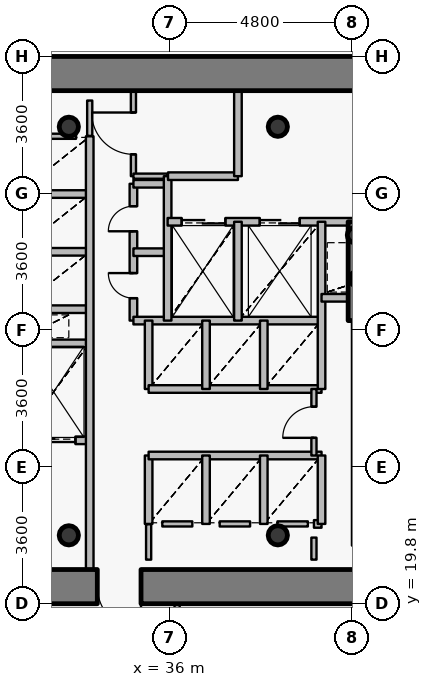
"""IFC4 building model, lengths in metres.
Left out: names, types, materials, properties, quantities, classifications, styles, units other than length and angle.
Written with IfcOpenShell. Run it as: python <this file> out.ifc"""

import sys

from ifc_helpers import new_model, si_unit, direction, frame, frame_2d, origin, origin_2d, place, context, subcontext, project, spatial, rectangle, hollow_circle, extrude, source, transform, mapped, element, fill, save


model = new_model("IFC4")
c1 = context("Model", 3, precision=1e-05, world=origin(), true_north=direction((0.0, 1.0)))
c2 = subcontext(c1, "Body", "Model", "MODEL_VIEW")
j1 = project(units=[si_unit("LENGTHUNIT", "METRE"), si_unit("PLANEANGLEUNIT", "RADIAN")], contexts=[c1])
p1 = place(None, origin())
s1 = spatial("IfcSite", under=j1, at=p1, CompositionType="ELEMENT")
p2 = place(p1, origin())
s2 = spatial("IfcBuilding", under=s1, at=p2, CompositionType="ELEMENT")
p3 = place(p2, frame((0.0, 0.0, 22.8)))
s3 = spatial("IfcBuildingStorey", under=s2, at=p3, CompositionType="ELEMENT", Elevation=22.8)
for number, where, z_axis, x_axis in (
    (1, (33.35, 21.6, 0.0), (0.0, 0.0, 1.0), (1.0, 0.0, 0.0)),
    (2, (38.85, 21.6, 0.0), (0.0, 0.0, 1.0), (1.0, 0.0, 0.0)),
    (3, (38.85, 32.35, 0.0), (0.0, 0.0, 1.0), (1.0, 0.0, 0.0)),
    (4, (33.35, 32.35, 0.0), (0.0, 0.0, 1.0), (1.0, 0.0, 0.0)),
):
    element("IfcColumn", number, at=place(p3, frame(where, z_axis=z_axis, x_axis=x_axis)), inside=s3, PredefinedType="COLUMN", context=c2, shape_type="SweptSolid", body=[
        extrude(hollow_circle(Radius=0.254, WallThickness=0.02, at=origin_2d()), origin(), (0.0, 0.0, 1.0), 4.2),
    ])
for number, where, z_axis, x_axis in (
    (5, (40.95, 28.35, 0.0), (0.0, 0.0, 1.0), (1.0, 0.0, 0.0)),
    (6, (40.88, 29.5, 0.0), (0.0, 0.0, 1.0), (1.0, 0.0, 0.0)),
):
    element("IfcColumn", number, at=place(p3, frame(where, z_axis=z_axis, x_axis=x_axis)), inside=s3, PredefinedType="COLUMN", context=c2, shape_type="SweptSolid", body=[
        extrude(hollow_circle(Radius=0.203, WallThickness=0.016, at=origin_2d()), origin(), (0.0, 0.0, 1.0), 4.2),
    ])
p4 = place(p3, frame((26.75, 33.75, 0.0), z_axis=(0.0, 0.0, 1.0), x_axis=(1.0, 0.0, 0.0)))
e7 = element("IfcWall", 7, at=p4, inside=s3, PredefinedType="SHEAR", context=c2, shape_type="SweptSolid", body=[
    extrude(rectangle(XDim=18.5, YDim=0.9, at=frame_2d((9.25, 0.0))), origin(), (0.0, 0.0, 1.0), 3.35),
])
p5 = place(p3, frame((45.25, 20.25, 0.0), z_axis=(0.0, 0.0, 1.0), x_axis=(-1.0, 0.0, 0.0)))
e8 = element("IfcWall", 8, at=p5, inside=s3, PredefinedType="SHEAR", context=c2, shape_type="SweptSolid", body=[
    extrude(rectangle(XDim=18.5, YDim=0.9, at=frame_2d((9.25, 0.0))), origin(), (0.0, 0.0, 1.0), 3.35),
])
p6 = place(p5, frame((10.0, 0.0, 0.0)))
e9 = element("IfcOpeningElement", 9, at=p6, cuts=e8, PredefinedType="OPENING", context=c2, shape_type="SweptSolid", body=[
    extrude(rectangle(XDim=1.15, YDim=2.15, at=origin_2d()), frame((0.575, 0.46, 1.075), z_axis=(0.0, -1.0, 0.0), x_axis=(1.0, 0.0, 0.0)), (0.0, 0.0, 1.0), 0.92),
])
p7 = place(p3, frame((40.9, 27.25, 0.0), z_axis=(0.0, 0.0, 1.0), x_axis=(0.0, 1.0, 0.0)))
e10 = element("IfcWall", 10, at=p7, inside=s3, PredefinedType="SHEAR", context=c2, shape_type="SweptSolid", body=[
    extrude(rectangle(XDim=2.6, YDim=0.4, at=frame_2d((1.3, 0.0))), origin(), (0.0, 0.0, 1.0), 3.5),
])
p8 = place(p3, frame((32.0, 24.1, 0.0), z_axis=(0.0, 0.0, 1.0), x_axis=(1.0, 0.0, 0.0)))
e11 = element("IfcWall", 11, at=p8, inside=s3, PredefinedType="PARTITIONING", context=c2, shape_type="SweptSolid", body=[
    extrude(rectangle(XDim=1.9, YDim=0.2, at=frame_2d((0.95, 0.0))), origin(), (0.0, 0.0, 1.0), 3.485),
])
p9 = place(p8, frame((0.375, 0.0, 0.0)))
e12 = element("IfcOpeningElement", 12, at=p9, cuts=e11, PredefinedType="OPENING", context=c2, shape_type="SweptSolid", body=[
    extrude(rectangle(XDim=1.15, YDim=2.15, at=origin_2d()), frame((0.575, 0.11, 1.075), z_axis=(0.0, -1.0, 0.0), x_axis=(1.0, 0.0, 0.0)), (0.0, 0.0, 1.0), 0.22),
])
for number, where, z_axis, x_axis in (
    (13, (32.0, 26.65, 0.0), (0.0, 0.0, 1.0), (1.0, 0.0, 0.0)),
    (14, (32.0, 27.55, 0.0), (0.0, 0.0, 1.0), (1.0, 0.0, 0.0)),
    (15, (32.0, 29.06, 0.0), (0.0, 0.0, 1.0), (1.0, 0.0, 0.0)),
    (16, (32.0, 30.58, 0.0), (0.0, 0.0, 1.0), (1.0, 0.0, 0.0)),
):
    element("IfcWall", number, at=place(p3, frame(where, z_axis=z_axis, x_axis=x_axis)), inside=s3, PredefinedType="PARTITIONING", context=c2, shape_type="SweptSolid", body=[
        extrude(rectangle(XDim=1.9, YDim=0.2, at=frame_2d((0.95, 0.0))), origin(), (0.0, 0.0, 1.0), 3.485),
    ])
p10 = place(p3, frame((33.9, 20.7, 0.0), z_axis=(0.0, 0.0, 1.0), x_axis=(0.0, 1.0, 0.0)))
e17 = element("IfcWall", 17, at=p10, inside=s3, PredefinedType="PARTITIONING", context=c2, shape_type="SweptSolid", body=[
    extrude(rectangle(XDim=11.4, YDim=0.2, at=frame_2d((5.7, 0.0))), origin(), (0.0, 0.0, 1.0), 3.485),
])
p11 = place(p3, frame((35.05, 27.25, 0.0), z_axis=(0.0, 0.0, 1.0), x_axis=(0.0, 1.0, 0.0)))
e18 = element("IfcWall", 18, at=p11, inside=s3, PredefinedType="PARTITIONING", context=c2, shape_type="SweptSolid", body=[
    extrude(rectangle(XDim=3.6, YDim=0.2, at=frame_2d((1.8, 0.0))), origin(), (0.0, 0.0, 1.0), 3.9),
])
p12 = place(p11, frame((0.59, 0.0, 0.0)))
e19 = element("IfcOpeningElement", 19, at=p12, cuts=e18, PredefinedType="OPENING", context=c2, shape_type="SweptSolid", body=[
    extrude(rectangle(XDim=0.66, YDim=2.05, at=origin_2d()), frame((0.33, 0.11, 1.025), z_axis=(0.0, -1.0, 0.0), x_axis=(1.0, 0.0, 0.0)), (0.0, 0.0, 1.0), 0.22),
])
p13 = place(p11, frame((2.35, 0.0, 0.0)))
e20 = element("IfcOpeningElement", 20, at=p13, cuts=e18, PredefinedType="OPENING", context=c2, shape_type="SweptSolid", body=[
    extrude(rectangle(XDim=0.66, YDim=2.05, at=origin_2d()), frame((0.33, 0.11, 1.025), z_axis=(0.0, -1.0, 0.0), x_axis=(1.0, 0.0, 0.0)), (0.0, 0.0, 1.0), 0.22),
])
p14 = place(p3, frame((35.05, 27.25, 0.0), z_axis=(0.0, 0.0, 1.0), x_axis=(1.0, 0.0, 0.0)))
e21 = element("IfcWall", 21, at=p14, inside=s3, PredefinedType="PARTITIONING", context=c2, shape_type="SweptSolid", body=[
    extrude(rectangle(XDim=4.95, YDim=0.2, at=frame_2d((2.475, 0.0))), origin(), (0.0, 0.0, 1.0), 3.485),
])
for number, where, z_axis, x_axis in (
    (22, (35.05, 29.05, 0.0), (0.0, 0.0, 1.0), (1.0, 0.0, 0.0)),
    (23, (35.05, 30.85, 0.0), (0.0, 0.0, 1.0), (1.0, 0.0, 0.0)),
):
    element("IfcWall", number, at=place(p3, frame(where, z_axis=z_axis, x_axis=x_axis)), inside=s3, PredefinedType="PARTITIONING", context=c2, shape_type="SweptSolid", body=[
        extrude(rectangle(XDim=0.9, YDim=0.2, at=frame_2d((0.45, 0.0))), origin(), (0.0, 0.0, 1.0), 3.9),
    ])
p15 = place(p3, frame((35.05, 31.05, 0.0), z_axis=(0.0, 0.0, 1.0), x_axis=(0.0, 1.0, 0.0)))
e24 = element("IfcWall", 24, at=p15, inside=s3, PredefinedType="PARTITIONING", context=c2, shape_type="SweptSolid", body=[
    extrude(rectangle(XDim=2.25, YDim=0.135, at=frame_2d((1.125, 0.0))), origin(), (0.0, 0.0, 1.0), 3.485),
])
p16 = place(p15, frame((0.575, 0.0, 0.0)))
e25 = element("IfcOpeningElement", 25, at=p16, cuts=e24, PredefinedType="OPENING", context=c2, shape_type="SweptSolid", body=[
    extrude(rectangle(XDim=1.1, YDim=2.15, at=origin_2d()), frame((0.55, 0.078, 1.075), z_axis=(0.0, -1.0, 0.0), x_axis=(1.0, 0.0, 0.0)), (0.0, 0.0, 1.0), 0.155),
])
p17 = place(p3, frame((35.05, 31.05, 0.0), z_axis=(0.0, 0.0, 1.0), x_axis=(1.0, 0.0, 0.0)))
e26 = element("IfcWall", 26, at=p17, inside=s3, PredefinedType="PARTITIONING", context=c2, shape_type="SweptSolid", body=[
    extrude(rectangle(XDim=0.9, YDim=0.135, at=frame_2d((0.45, 0.0))), origin(), (0.0, 0.0, 1.0), 3.9),
])
p18 = place(p3, frame((35.45, 21.9, 0.0), z_axis=(0.0, 0.0, 1.0), x_axis=(0.0, 1.0, 0.0)))
e27 = element("IfcWall", 27, at=p18, inside=s3, PredefinedType="PARTITIONING", context=c2, shape_type="SweptSolid", body=[
    extrude(rectangle(XDim=1.8, YDim=0.2, at=frame_2d((0.9, 0.0))), origin(), (0.0, 0.0, 1.0), 3.9),
])
p19 = place(p3, frame((35.45, 23.7, 0.0), z_axis=(0.0, 0.0, 1.0), x_axis=(1.0, 0.0, 0.0)))
e28 = element("IfcWall", 28, at=p19, inside=s3, PredefinedType="PARTITIONING", context=c2, shape_type="SweptSolid", body=[
    extrude(rectangle(XDim=4.55, YDim=0.2, at=frame_2d((2.275, 0.0))), origin(), (0.0, 0.0, 1.0), 3.485),
])
p20 = place(p3, frame((35.45, 25.45, 0.0), z_axis=(0.0, 0.0, 1.0), x_axis=(0.0, 1.0, 0.0)))
e29 = element("IfcWall", 29, at=p20, inside=s3, PredefinedType="PARTITIONING", context=c2, shape_type="SweptSolid", body=[
    extrude(rectangle(XDim=1.8, YDim=0.2, at=frame_2d((0.9, 0.0))), origin(), (0.0, 0.0, 1.0), 3.9),
])
p21 = place(p3, frame((35.45, 25.45, 0.0), z_axis=(0.0, 0.0, 1.0), x_axis=(1.0, 0.0, 0.0)))
e30 = element("IfcWall", 30, at=p21, inside=s3, PredefinedType="PARTITIONING", context=c2, shape_type="SweptSolid", body=[
    extrude(rectangle(XDim=4.55, YDim=0.2, at=frame_2d((2.275, 0.0))), origin(), (0.0, 0.0, 1.0), 3.485),
])
p22 = place(p3, frame((35.95, 27.25, 0.0), z_axis=(0.0, 0.0, 1.0), x_axis=(0.0, 1.0, 0.0)))
e31 = element("IfcWall", 31, at=p22, inside=s3, PredefinedType="PARTITIONING", context=c2, shape_type="SweptSolid", body=[
    extrude(rectangle(XDim=3.8, YDim=0.2, at=frame_2d((1.9, 0.0))), origin(), (0.0, 0.0, 1.0), 3.9),
])
p23 = place(p3, frame((35.95, 29.85, 0.0), z_axis=(0.0, 0.0, 1.0), x_axis=(1.0, 0.0, 0.0)))
e32 = element("IfcWall", 32, at=p23, inside=s3, PredefinedType="PARTITIONING", context=c2, shape_type="SweptSolid", body=[
    extrude(rectangle(XDim=8.49, YDim=0.2, at=frame_2d((4.245, 0.0))), origin(), (0.0, 0.0, 1.0), 3.485),
])
p24 = place(p23, frame((6.1, 0.0, 0.0)))
e33 = element("IfcOpeningElement", 33, at=p24, cuts=e32, PredefinedType="OPENING", context=c2, shape_type="SweptSolid", body=[
    extrude(rectangle(XDim=1.2, YDim=2.15, at=origin_2d()), frame((0.6, 0.11, 1.075), z_axis=(0.0, -1.0, 0.0), x_axis=(1.0, 0.0, 0.0)), (0.0, 0.0, 1.0), 0.22),
])
p25 = place(p23, frame((0.37, 0.0, 0.0)))
e34 = element("IfcOpeningElement", 34, at=p25, cuts=e32, PredefinedType="OPENING", context=c2, shape_type="SweptSolid", body=[
    extrude(rectangle(XDim=1.15, YDim=2.15, at=origin_2d()), frame((0.575, 0.11, 1.075), z_axis=(0.0, -1.0, 0.0), x_axis=(1.0, 0.0, 0.0)), (0.0, 0.0, 1.0), 0.22),
])
p26 = place(p23, frame((2.425, 0.0, 0.0)))
e35 = element("IfcOpeningElement", 35, at=p26, cuts=e32, PredefinedType="OPENING", context=c2, shape_type="SweptSolid", body=[
    extrude(rectangle(XDim=1.05, YDim=2.15, at=origin_2d()), frame((0.525, 0.11, 1.075), z_axis=(0.0, -1.0, 0.0), x_axis=(1.0, 0.0, 0.0)), (0.0, 0.0, 1.0), 0.22),
])
p27 = place(p3, frame((35.96, 31.05, 0.0), z_axis=(0.0, 0.0, 1.0), x_axis=(1.0, 0.0, 0.0)))
e36 = element("IfcWall", 36, at=p27, inside=s3, PredefinedType="PARTITIONING", context=c2, shape_type="SweptSolid", body=[
    extrude(rectangle(XDim=1.84, YDim=0.2, at=frame_2d((0.92, 0.0))), origin(), (0.0, 0.0, 1.0), 3.9),
])
p28 = place(p3, frame((36.2, 17.9, 0.0), z_axis=(0.0, 0.0, 1.0), x_axis=(0.0, 1.0, 0.0)))
e37 = element("IfcWall", 37, at=p28, inside=s3, PredefinedType="PARTITIONING", context=c2, shape_type="SweptSolid", body=[
    extrude(rectangle(XDim=1.9, YDim=0.135, at=frame_2d((0.95, 0.0))), origin(), (0.0, 0.0, 1.0), 2.685),
])
p29 = place(p28, frame((0.425, 0.0, 0.0)))
e38 = element("IfcOpeningElement", 38, at=p29, cuts=e37, PredefinedType="OPENING", context=c2, shape_type="SweptSolid", body=[
    extrude(rectangle(XDim=1.05, YDim=2.15, at=origin_2d()), frame((0.525, 0.078, 1.075), z_axis=(0.0, -1.0, 0.0), x_axis=(1.0, 0.0, 0.0)), (0.0, 0.0, 1.0), 0.155),
])
for number, where, z_axis, x_axis in (
    (39, (36.96, 21.9, 0.0), (0.0, 0.0, 1.0), (0.0, 1.0, 0.0)),
    (40, (36.96, 25.45, 0.0), (0.0, 0.0, 1.0), (0.0, 1.0, 0.0)),
):
    element("IfcWall", number, at=place(p3, frame(where, z_axis=z_axis, x_axis=x_axis)), inside=s3, PredefinedType="PARTITIONING", context=c2, shape_type="SweptSolid", body=[
        extrude(rectangle(XDim=1.8, YDim=0.2, at=frame_2d((0.9, 0.0))), origin(), (0.0, 0.0, 1.0), 3.9),
    ])
p30 = place(p3, frame((37.8, 27.25, 0.0), z_axis=(0.0, 0.0, 1.0), x_axis=(0.0, 1.0, 0.0)))
e41 = element("IfcWall", 41, at=p30, inside=s3, PredefinedType="PARTITIONING", context=c2, shape_type="SweptSolid", body=[
    extrude(rectangle(XDim=2.6, YDim=0.2, at=frame_2d((1.3, 0.0))), origin(), (0.0, 0.0, 1.0), 3.9),
])
p31 = place(p3, frame((37.8, 31.05, 0.0), z_axis=(0.0, 0.0, 1.0), x_axis=(0.0, 1.0, 0.0)))
e42 = element("IfcWall", 42, at=p31, inside=s3, PredefinedType="PARTITIONING", context=c2, shape_type="SweptSolid", body=[
    extrude(rectangle(XDim=2.25, YDim=0.2, at=frame_2d((1.125, 0.0))), origin(), (0.0, 0.0, 1.0), 3.485),
])
for number, where, z_axis, x_axis in (
    (43, (38.48, 21.9, 0.0), (0.0, 0.0, 1.0), (0.0, 1.0, 0.0)),
    (44, (38.48, 25.45, 0.0), (0.0, 0.0, 1.0), (0.0, 1.0, 0.0)),
):
    element("IfcWall", number, at=place(p3, frame(where, z_axis=z_axis, x_axis=x_axis)), inside=s3, PredefinedType="PARTITIONING", context=c2, shape_type="SweptSolid", body=[
        extrude(rectangle(XDim=1.8, YDim=0.2, at=frame_2d((0.9, 0.0))), origin(), (0.0, 0.0, 1.0), 3.9),
    ])
p32 = place(p3, frame((39.8, 21.9, 0.0), z_axis=(0.0, 0.0, 1.0), x_axis=(1.0, 0.0, 0.0)))
e45 = element("IfcWall", 45, at=p32, inside=s3, PredefinedType="PARTITIONING", context=c2, shape_type="SweptSolid", body=[
    extrude(rectangle(XDim=0.2, YDim=0.2, at=frame_2d((0.1, 0.0))), origin(), (0.0, 0.0, 1.0), 3.9),
])
p33 = place(p3, frame((39.8, 23.7, 0.0), z_axis=(0.0, 0.0, 1.0), x_axis=(0.0, 1.0, 0.0)))
e46 = element("IfcWall", 46, at=p33, inside=s3, PredefinedType="PARTITIONING", context=c2, shape_type="SweptSolid", body=[
    extrude(rectangle(XDim=1.75, YDim=0.135, at=frame_2d((0.875, 0.0))), origin(), (0.0, 0.0, 1.0), 3.9),
])
p34 = place(p33, frame((0.465, 0.0, 0.0)))
e47 = element("IfcOpeningElement", 47, at=p34, cuts=e46, PredefinedType="OPENING", context=c2, shape_type="SweptSolid", body=[
    extrude(rectangle(XDim=0.82, YDim=2.1, at=origin_2d()), frame((0.41, 0.078, 1.05), z_axis=(0.0, -1.0, 0.0), x_axis=(1.0, 0.0, 0.0)), (0.0, 0.0, 1.0), 0.155),
])
p35 = place(p3, frame((40.0, 21.9, 0.0), z_axis=(0.0, 0.0, 1.0), x_axis=(0.0, 1.0, 0.0)))
e48 = element("IfcWall", 48, at=p35, inside=s3, PredefinedType="PARTITIONING", context=c2, shape_type="SweptSolid", body=[
    extrude(rectangle(XDim=1.8, YDim=0.2, at=frame_2d((0.9, 0.0))), origin(), (0.0, 0.0, 1.0), 3.9),
])
p36 = place(p3, frame((40.0, 25.45, 0.0), z_axis=(0.0, 0.0, 1.0), x_axis=(0.0, 1.0, 0.0)))
e49 = element("IfcWall", 49, at=p36, inside=s3, PredefinedType="PARTITIONING", context=c2, shape_type="SweptSolid", body=[
    extrude(rectangle(XDim=4.4, YDim=0.2, at=frame_2d((2.2, 0.0))), origin(), (0.0, 0.0, 1.0), 3.9),
])
p37 = place(p3, frame((40.0, 27.85, 0.0), z_axis=(0.0, 0.0, 1.0), x_axis=(1.0, 0.0, 0.0)))
e50 = element("IfcWall", 50, at=p37, inside=s3, PredefinedType="PARTITIONING", context=c2, shape_type="SweptSolid", body=[
    extrude(rectangle(XDim=0.9, YDim=0.2, at=frame_2d((0.45, 0.0))), origin(), (0.0, 0.0, 1.0), 3.9),
])
p38 = place(p3, frame((40.9, 21.33, 0.0), z_axis=(0.0, 0.0, 1.0), x_axis=(0.0, 1.0, 0.0)))
e51 = element("IfcWall", 51, at=p38, inside=s3, PredefinedType="PARTITIONING", context=c2, shape_type="SweptSolid", body=[
    extrude(rectangle(XDim=5.91, YDim=0.2, at=frame_2d((2.955, 0.0))), origin(), (0.0, 0.0, 1.0), 3.435),
])
p39 = place(p3, frame((36.6, 21.9, 0.0), z_axis=(0.0, 0.0, 1.0), x_axis=(-1.0, 0.0, 0.0)))
e52 = element("IfcWall", 52, at=p39, inside=s3, PredefinedType="PARTITIONING", context=c2, shape_type="SweptSolid", body=[
    extrude(rectangle(XDim=0.79, YDim=0.135, at=frame_2d((0.395, 0.0))), origin(), (0.0, 0.0, 1.0), 3.9),
])
p40 = place(p3, frame((38.12, 21.9, 0.0), z_axis=(0.0, 0.0, 1.0), x_axis=(-1.0, 0.0, 0.0)))
e53 = element("IfcWall", 53, at=p40, inside=s3, PredefinedType="PARTITIONING", context=c2, shape_type="SweptSolid", body=[
    extrude(rectangle(XDim=0.8, YDim=0.135, at=frame_2d((0.4, 0.0))), origin(), (0.0, 0.0, 1.0), 3.9),
])
p41 = place(p3, frame((39.64, 21.9, 0.0), z_axis=(0.0, 0.0, 1.0), x_axis=(-1.0, 0.0, 0.0)))
e54 = element("IfcWall", 54, at=p41, inside=s3, PredefinedType="PARTITIONING", context=c2, shape_type="SweptSolid", body=[
    extrude(rectangle(XDim=0.8, YDim=0.135, at=frame_2d((0.4, 0.0))), origin(), (0.0, 0.0, 1.0), 3.485),
])
p42 = place(p3, frame((32.36, 32.1, 0.0), z_axis=(0.0, 0.0, 1.0), x_axis=(1.0, 0.0, 0.0)))
e55 = element("IfcWall", 55, at=p42, inside=s3, PredefinedType="PARTITIONING", context=c2, shape_type="SweptSolid", body=[
    extrude(rectangle(XDim=1.18, YDim=0.135, at=frame_2d((0.59, 0.0))), origin(), (0.0, 0.0, 1.0), 3.485),
])
p43 = place(p3, frame((39.8, 20.96, 0.0), z_axis=(0.0, 0.0, 1.0), x_axis=(0.0, 1.0, 0.0)))
e56 = element("IfcWall", 56, at=p43, inside=s3, PredefinedType="PARTITIONING", context=c2, shape_type="SweptSolid", body=[
    extrude(rectangle(XDim=0.58, YDim=0.135, at=frame_2d((0.29, 0.0))), origin(), (0.0, 0.0, 1.0), 3.435),
])
for number, where, z_axis, x_axis in (
    (57, (35.45, 21.89, 0.0), (0.0, 0.0, 1.0), (0.0, -1.0, 0.0)),
    (58, (33.9, 32.11, 0.0), (0.0, 0.0, 1.0), (0.0, 1.0, 0.0)),
):
    element("IfcWall", number, at=place(p3, frame(where, z_axis=z_axis, x_axis=x_axis)), inside=s3, PredefinedType="PARTITIONING", context=c2, shape_type="SweptSolid", body=[
        extrude(rectangle(XDim=0.93, YDim=0.135, at=frame_2d((0.465, 0.0))), origin(), (0.0, 0.0, 1.0), 3.485),
    ])
m1 = source(origin(), c2, "Body", "SweptSolid", [
    extrude(rectangle(XDim=1.15, YDim=2.15, at=origin_2d()), frame((0.575, 0.025, 1.075), z_axis=(0.0, -1.0, 0.0), x_axis=(1.0, 0.0, 0.0)), (0.0, 0.0, 1.0), 0.05),
])
p44 = place(p6, origin())
e59 = element("IfcDoor", 59, at=p44, inside=s3, OperationType="SINGLE_SWING_LEFT", PredefinedType="DOOR", context=c2, shape_type="MappedRepresentation", body=[
    mapped(m1, transform((0.0, 0.0, 0.0), x_axis=(1.0, 0.0, 0.0), y_axis=(0.0, 1.0, 0.0), z_axis=(0.0, 0.0, 1.0), scale=1.0)),
])
fill(e9, e59)
m2 = source(origin(), c2, "Body", "SweptSolid", [
    extrude(rectangle(XDim=1.15, YDim=2.15, at=origin_2d()), frame((0.575, 0.025, 1.075), z_axis=(0.0, -1.0, 0.0), x_axis=(1.0, 0.0, 0.0)), (0.0, 0.0, 1.0), 0.05),
])
p45 = place(p25, origin())
e60 = element("IfcDoor", 60, at=p45, inside=s3, OperationType="DOUBLE_DOOR_SLIDING", PredefinedType="USERDEFINED", context=c2, shape_type="MappedRepresentation", body=[
    mapped(m2, transform((0.0, 0.0, 0.0), x_axis=(1.0, 0.0, 0.0), y_axis=(0.0, 1.0, 0.0), z_axis=(0.0, 0.0, 1.0), scale=1.0)),
])
fill(e34, e60)
p46 = place(p9, origin())
e61 = element("IfcDoor", 61, at=p46, inside=s3, OperationType="DOUBLE_DOOR_SLIDING", PredefinedType="USERDEFINED", context=c2, shape_type="MappedRepresentation", body=[
    mapped(m2, transform((0.0, 0.0, 0.0), x_axis=(1.0, 0.0, 0.0), y_axis=(0.0, 1.0, 0.0), z_axis=(0.0, 0.0, 1.0), scale=1.0)),
])
fill(e12, e61)
m3 = source(origin(), c2, "Body", "SweptSolid", [
    extrude(rectangle(XDim=1.05, YDim=2.15, at=origin_2d()), frame((0.525, 0.025, 1.075), z_axis=(0.0, -1.0, 0.0), x_axis=(1.0, 0.0, 0.0)), (0.0, 0.0, 1.0), 0.05),
])
p47 = place(p26, origin())
e62 = element("IfcDoor", 62, at=p47, inside=s3, OperationType="DOUBLE_DOOR_SLIDING", PredefinedType="USERDEFINED", context=c2, shape_type="MappedRepresentation", body=[
    mapped(m3, transform((0.0, 0.0, 0.0), x_axis=(1.0, 0.0, 0.0), y_axis=(0.0, 1.0, 0.0), z_axis=(0.0, 0.0, 1.0), scale=1.0)),
])
fill(e35, e62)
m4 = source(origin(), c2, "Body", "SweptSolid", [
    extrude(rectangle(XDim=0.66, YDim=2.05, at=origin_2d()), frame((0.33, 0.025, 1.025), z_axis=(0.0, -1.0, 0.0), x_axis=(1.0, 0.0, 0.0)), (0.0, 0.0, 1.0), 0.05),
])
p48 = place(p12, origin())
e63 = element("IfcDoor", 63, at=p48, inside=s3, OperationType="SINGLE_SWING_RIGHT", PredefinedType="USERDEFINED", context=c2, shape_type="MappedRepresentation", body=[
    mapped(m4, transform((0.0, 0.0, 0.0), x_axis=(1.0, 0.0, 0.0), y_axis=(0.0, 1.0, 0.0), z_axis=(0.0, 0.0, 1.0), scale=1.0)),
])
fill(e19, e63)
p49 = place(p13, origin())
e64 = element("IfcDoor", 64, at=p49, inside=s3, OperationType="SINGLE_SWING_LEFT", PredefinedType="USERDEFINED", context=c2, shape_type="MappedRepresentation", body=[
    mapped(m4, transform((0.0, 0.0, 0.0), x_axis=(1.0, 0.0, 0.0), y_axis=(0.0, 1.0, 0.0), z_axis=(0.0, 0.0, 1.0), scale=1.0)),
])
fill(e20, e64)
m5 = source(origin(), c2, "Body", "SweptSolid", [
    extrude(rectangle(XDim=1.1, YDim=2.15, at=origin_2d()), frame((0.55, 0.025, 1.075), z_axis=(0.0, -1.0, 0.0), x_axis=(1.0, 0.0, 0.0)), (0.0, 0.0, 1.0), 0.05),
])
p50 = place(p16, origin())
e65 = element("IfcDoor", 65, at=p50, inside=s3, OperationType="SINGLE_SWING_RIGHT", PredefinedType="DOOR", context=c2, shape_type="MappedRepresentation", body=[
    mapped(m5, transform((0.0, 0.0, 0.0), x_axis=(1.0, 0.0, 0.0), y_axis=(0.0, 1.0, 0.0), z_axis=(0.0, 0.0, 1.0), scale=1.0)),
])
fill(e25, e65)
m6 = source(origin(), c2, "Body", "SweptSolid", [
    extrude(rectangle(XDim=0.82, YDim=2.1, at=origin_2d()), frame((0.41, 0.025, 1.05), z_axis=(0.0, -1.0, 0.0), x_axis=(1.0, 0.0, 0.0)), (0.0, 0.0, 1.0), 0.05),
])
p51 = place(p34, origin())
e66 = element("IfcDoor", 66, at=p51, inside=s3, OperationType="SINGLE_SWING_LEFT", PredefinedType="DOOR", context=c2, shape_type="MappedRepresentation", body=[
    mapped(m6, transform((0.0, 0.0, 0.0), x_axis=(1.0, 0.0, 0.0), y_axis=(0.0, 1.0, 0.0), z_axis=(0.0, 0.0, 1.0), scale=1.0)),
])
fill(e47, e66)
save(model, sys.argv[1])
